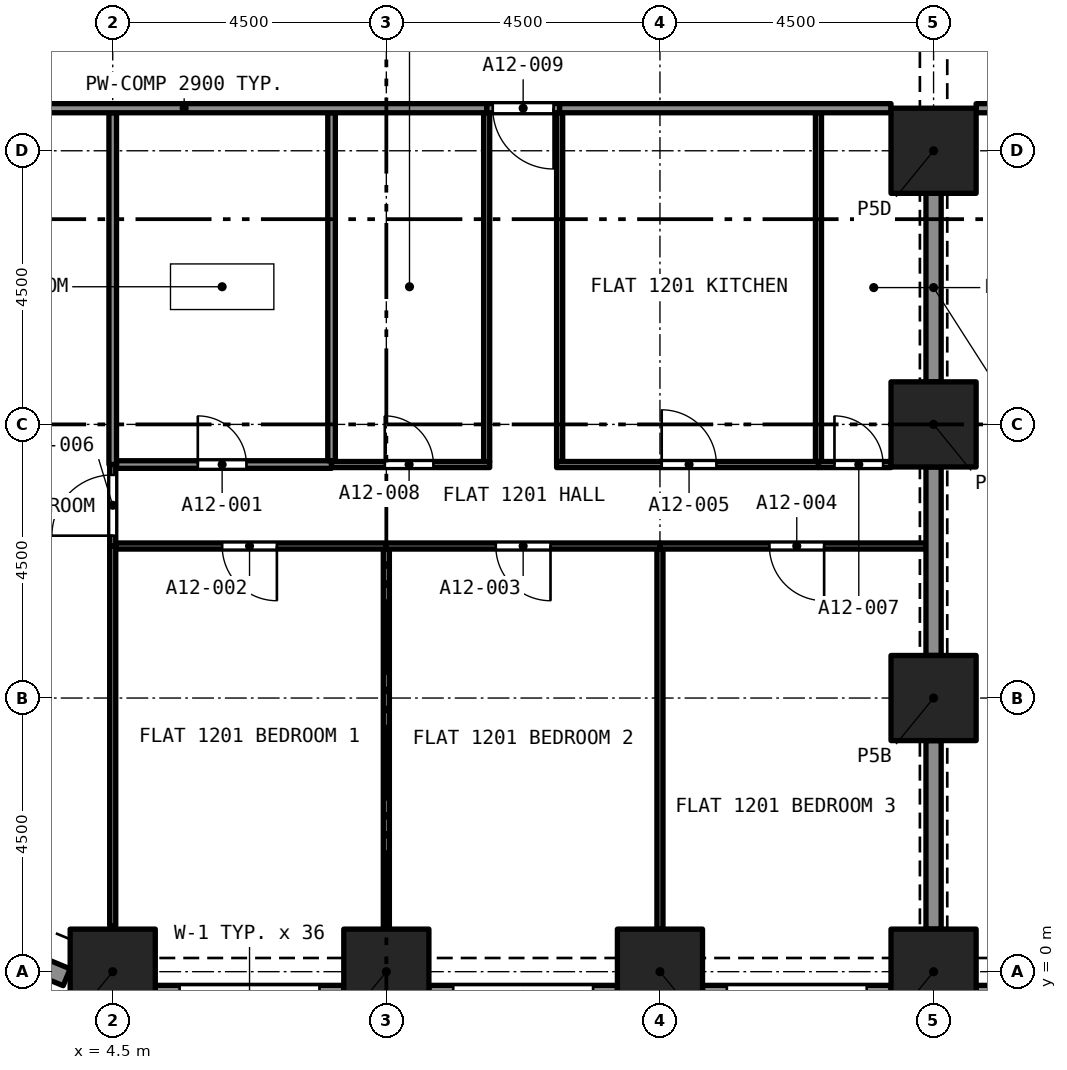
"""IFC4 building model, lengths in metres.
Left out: names, types, materials, properties, quantities, classifications, styles, units other than length and angle.
Written with IfcOpenShell. Run it as: python <this file> out.ifc"""

import sys

from ifc_helpers import new_model, si_unit, direction, frame, frame_2d, origin, origin_2d, place, context, subcontext, project, spatial, rectangle, extrude, element, fill, save


model = new_model("IFC4")
c1 = context("Model", 3, precision=1e-05, world=origin(), true_north=direction((0.0, 1.0)))
c2 = subcontext(c1, "Body", "Model", "MODEL_VIEW")
j1 = project(units=[si_unit("LENGTHUNIT", "METRE"), si_unit("PLANEANGLEUNIT", "RADIAN")], contexts=[c1])
p1 = place(None, origin())
s1 = spatial("IfcSite", under=j1, at=p1, CompositionType="ELEMENT")
p2 = place(p1, origin())
s2 = spatial("IfcBuilding", under=s1, at=p2, CompositionType="ELEMENT")
p3 = place(p2, frame((0.0, 0.0, 49.6)))
s3 = spatial("IfcBuildingStorey", under=s2, at=p3, CompositionType="ELEMENT", Elevation=49.6)
for number, where, z_axis, x_axis in (
    (1, (4.5, 0.0, 0.0), (0.0, 0.0, 1.0), (1.0, 0.0, 0.0)),
    (2, (9.0, 0.0, 0.0), (0.0, 0.0, 1.0), (1.0, 0.0, 0.0)),
    (3, (13.5, 0.0, 0.0), (0.0, 0.0, 1.0), (1.0, 0.0, 0.0)),
    (4, (18.0, 0.0, 0.0), (0.0, 0.0, 1.0), (1.0, 0.0, 0.0)),
    (5, (18.0, 4.5, 0.0), (0.0, 0.0, 1.0), (1.0, 0.0, 0.0)),
    (6, (18.0, 9.0, 0.0), (0.0, 0.0, 1.0), (1.0, 0.0, 0.0)),
    (7, (18.0, 13.5, 0.0), (0.0, 0.0, 1.0), (1.0, 0.0, 0.0)),
):
    element("IfcColumn", number, at=place(p3, frame(where, z_axis=z_axis, x_axis=x_axis)), inside=s3, PredefinedType="COLUMN", context=c2, shape_type="SweptSolid", body=[
        extrude(rectangle(XDim=1.4, YDim=1.4, at=origin_2d()), origin(), (0.0, 0.0, 1.0), 3.2),
    ])
p4 = place(p3, frame((3.743, -0.092, 0.0), z_axis=(0.0, 0.0, 1.0), x_axis=(-0.923857286003, 0.382737135771, 0.0)))
e8 = element("IfcWall", 8, at=p4, inside=s3, PredefinedType="SOLIDWALL", context=c2, shape_type="SweptSolid", body=[
    extrude(rectangle(XDim=1.865, YDim=0.3, at=frame_2d((0.933, 0.0))), origin(), (0.0, 0.0, 1.0), 3.2),
])
p5 = place(p4, frame((0.508, 0.0, 0.45)))
e9 = element("IfcOpeningElement", 9, at=p5, cuts=e8, PredefinedType="OPENING", context=c2, shape_type="SweptSolid", body=[
    extrude(rectangle(XDim=1.1, YDim=1.95, at=frame_2d((0.55, 0.975))), frame((0.0, 0.16, 0.0), z_axis=(0.0, -1.0, 0.0), x_axis=(1.0, 0.0, 0.0)), (0.0, 0.0, 1.0), 0.32),
])
p6 = place(p3, frame((8.3, -0.375, 0.0), z_axis=(0.0, 0.0, 1.0), x_axis=(-1.0, 0.0, 0.0)))
e10 = element("IfcWall", 10, at=p6, inside=s3, PredefinedType="SOLIDWALL", context=c2, shape_type="SweptSolid", body=[
    extrude(rectangle(XDim=3.1, YDim=0.3, at=frame_2d((1.55, 0.0))), origin(), (0.0, 0.0, 1.0), 3.2),
])
p7 = place(p6, frame((0.4, 0.0, 0.45)))
e11 = element("IfcOpeningElement", 11, at=p7, cuts=e10, PredefinedType="OPENING", context=c2, shape_type="SweptSolid", body=[
    extrude(rectangle(XDim=2.3, YDim=1.95, at=frame_2d((1.15, 0.975))), frame((0.0, 0.16, 0.0), z_axis=(0.0, -1.0, 0.0), x_axis=(1.0, 0.0, 0.0)), (0.0, 0.0, 1.0), 0.32),
])
p8 = place(p3, frame((12.8, -0.375, 0.0), z_axis=(0.0, 0.0, 1.0), x_axis=(-1.0, 0.0, 0.0)))
e12 = element("IfcWall", 12, at=p8, inside=s3, PredefinedType="SOLIDWALL", context=c2, shape_type="SweptSolid", body=[
    extrude(rectangle(XDim=3.1, YDim=0.3, at=frame_2d((1.55, 0.0))), origin(), (0.0, 0.0, 1.0), 3.2),
])
p9 = place(p8, frame((0.4, 0.0, 0.45)))
e13 = element("IfcOpeningElement", 13, at=p9, cuts=e12, PredefinedType="OPENING", context=c2, shape_type="SweptSolid", body=[
    extrude(rectangle(XDim=2.3, YDim=1.95, at=frame_2d((1.15, 0.975))), frame((0.0, 0.16, 0.0), z_axis=(0.0, -1.0, 0.0), x_axis=(1.0, 0.0, 0.0)), (0.0, 0.0, 1.0), 0.32),
])
p10 = place(p3, frame((17.3, -0.375, 0.0), z_axis=(0.0, 0.0, 1.0), x_axis=(-1.0, 0.0, 0.0)))
e14 = element("IfcWall", 14, at=p10, inside=s3, PredefinedType="SOLIDWALL", context=c2, shape_type="SweptSolid", body=[
    extrude(rectangle(XDim=3.1, YDim=0.3, at=frame_2d((1.55, 0.0))), origin(), (0.0, 0.0, 1.0), 3.2),
])
p11 = place(p10, frame((0.4, 0.0, 0.45)))
e15 = element("IfcOpeningElement", 15, at=p11, cuts=e14, PredefinedType="OPENING", context=c2, shape_type="SweptSolid", body=[
    extrude(rectangle(XDim=2.3, YDim=1.95, at=frame_2d((1.15, 0.975))), frame((0.0, 0.16, 0.0), z_axis=(0.0, -1.0, 0.0), x_axis=(1.0, 0.0, 0.0)), (0.0, 0.0, 1.0), 0.32),
])
p12 = place(p3, frame((21.8, -0.375, 0.0), z_axis=(0.0, 0.0, 1.0), x_axis=(-1.0, 0.0, 0.0)))
e16 = element("IfcWall", 16, at=p12, inside=s3, PredefinedType="SOLIDWALL", context=c2, shape_type="SweptSolid", body=[
    extrude(rectangle(XDim=3.1, YDim=0.3, at=frame_2d((1.55, 0.0))), origin(), (0.0, 0.0, 1.0), 3.2),
])
p13 = place(p12, frame((0.4, 0.0, 0.45)))
e17 = element("IfcOpeningElement", 17, at=p13, cuts=e16, PredefinedType="OPENING", context=c2, shape_type="SweptSolid", body=[
    extrude(rectangle(XDim=2.3, YDim=1.95, at=frame_2d((1.15, 0.975))), frame((0.0, 0.16, 0.0), z_axis=(0.0, -1.0, 0.0), x_axis=(1.0, 0.0, 0.0)), (0.0, 0.0, 1.0), 0.32),
])
p14 = place(p3, frame((4.562, 8.34, 0.0), z_axis=(0.0, 0.0, 1.0), x_axis=(1.0, 0.0, 0.0)))
e18 = element("IfcWall", 18, at=p14, inside=s3, PredefinedType="PARTITIONING", context=c2, shape_type="SweptSolid", body=[
    extrude(rectangle(XDim=3.536, YDim=0.125, at=frame_2d((1.768, 0.0))), origin(), (0.0, 0.0, 1.0), 2.9),
])
p15 = place(p14, frame((1.337, 0.0, 0.0)))
e19 = element("IfcOpeningElement", 19, at=p15, cuts=e18, PredefinedType="OPENING", context=c2, shape_type="SweptSolid", body=[
    extrude(rectangle(XDim=0.8, YDim=2.1, at=frame_2d((0.4, 1.05))), frame((0.0, 0.073, 0.0), z_axis=(0.0, -1.0, 0.0), x_axis=(1.0, 0.0, 0.0)), (0.0, 0.0, 1.0), 0.145),
])
p16 = place(p3, frame((4.5, 8.34, 0.0), z_axis=(0.0, 0.0, 1.0), x_axis=(0.0, 1.0, 0.0)))
e20 = element("IfcWall", 20, at=p16, inside=s3, PredefinedType="PARTITIONING", context=c2, shape_type="SweptSolid", body=[
    extrude(rectangle(XDim=5.785, YDim=0.125, at=frame_2d((2.893, 0.0))), origin(), (0.0, 0.0, 1.0), 2.9),
])
p17 = place(p3, frame((8.099, 8.403, 0.0), z_axis=(0.0, 0.0, 1.0), x_axis=(0.0, 1.0, 0.0)))
e21 = element("IfcWall", 21, at=p17, inside=s3, PredefinedType="PARTITIONING", context=c2, shape_type="SweptSolid", body=[
    extrude(rectangle(XDim=5.722, YDim=0.125, at=frame_2d((2.861, 0.0))), origin(), (0.0, 0.0, 1.0), 2.9),
])
p18 = place(p3, frame((9.0, 0.7, 0.0), z_axis=(0.0, 0.0, 1.0), x_axis=(0.0, 1.0, 0.0)))
e22 = element("IfcWall", 22, at=p18, inside=s3, PredefinedType="PARTITIONING", context=c2, shape_type="SweptSolid", body=[
    extrude(rectangle(XDim=6.25, YDim=0.1, at=frame_2d((3.125, 0.0))), origin(), (0.0, 0.0, 1.0), 2.9),
])
p19 = place(p3, frame((9.0, 7.0, 0.0), z_axis=(0.0, 0.0, 1.0), x_axis=(-1.0, 0.0, 0.0)))
e23 = element("IfcWall", 23, at=p19, inside=s3, PredefinedType="PARTITIONING", context=c2, shape_type="SweptSolid", body=[
    extrude(rectangle(XDim=4.45, YDim=0.1, at=frame_2d((2.225, 0.0))), origin(), (0.0, 0.0, 1.0), 2.9),
])
p20 = place(p19, frame((1.8, 0.0, 0.0)))
e24 = element("IfcOpeningElement", 24, at=p20, cuts=e23, PredefinedType="OPENING", context=c2, shape_type="SweptSolid", body=[
    extrude(rectangle(XDim=0.9, YDim=2.1, at=frame_2d((0.45, 1.05))), frame((0.0, 0.06, 0.0), z_axis=(0.0, -1.0, 0.0), x_axis=(1.0, 0.0, 0.0)), (0.0, 0.0, 1.0), 0.12),
])
p21 = place(p3, frame((4.5, 0.758, 0.0), z_axis=(0.0, 0.0, 1.0), x_axis=(0.0, 1.0, 0.0)))
e25 = element("IfcWall", 25, at=p21, inside=s3, PredefinedType="PARTITIONING", context=c2, shape_type="SweptSolid", body=[
    extrude(rectangle(XDim=6.242, YDim=0.1, at=frame_2d((3.121, 0.0))), origin(), (0.0, 0.0, 1.0), 2.9),
])
p22 = place(p3, frame((13.5, 0.7, 0.0), z_axis=(0.0, 0.0, 1.0), x_axis=(0.0, 1.0, 0.0)))
e26 = element("IfcWall", 26, at=p22, inside=s3, PredefinedType="PARTITIONING", context=c2, shape_type="SweptSolid", body=[
    extrude(rectangle(XDim=6.25, YDim=0.1, at=frame_2d((3.125, 0.0))), origin(), (0.0, 0.0, 1.0), 2.9),
])
p23 = place(p3, frame((13.5, 7.0, 0.0), z_axis=(0.0, 0.0, 1.0), x_axis=(-1.0, 0.0, 0.0)))
e27 = element("IfcWall", 27, at=p23, inside=s3, PredefinedType="PARTITIONING", context=c2, shape_type="SweptSolid", body=[
    extrude(rectangle(XDim=4.5, YDim=0.1, at=frame_2d((2.25, 0.0))), origin(), (0.0, 0.0, 1.0), 2.9),
])
p24 = place(p23, frame((1.8, 0.0, 0.0)))
e28 = element("IfcOpeningElement", 28, at=p24, cuts=e27, PredefinedType="OPENING", context=c2, shape_type="SweptSolid", body=[
    extrude(rectangle(XDim=0.9, YDim=2.1, at=frame_2d((0.45, 1.05))), frame((0.0, 0.06, 0.0), z_axis=(0.0, -1.0, 0.0), x_axis=(1.0, 0.0, 0.0)), (0.0, 0.0, 1.0), 0.12),
])
p25 = place(p3, frame((17.875, 7.0, 0.0), z_axis=(0.0, 0.0, 1.0), x_axis=(-1.0, 0.0, 0.0)))
e29 = element("IfcWall", 29, at=p25, inside=s3, PredefinedType="PARTITIONING", context=c2, shape_type="SweptSolid", body=[
    extrude(rectangle(XDim=4.375, YDim=0.1, at=frame_2d((2.188, 0.0))), origin(), (0.0, 0.0, 1.0), 2.9),
])
p26 = place(p25, frame((1.675, 0.0, 0.0)))
e30 = element("IfcOpeningElement", 30, at=p26, cuts=e29, PredefinedType="OPENING", context=c2, shape_type="SweptSolid", body=[
    extrude(rectangle(XDim=0.9, YDim=2.1, at=frame_2d((0.45, 1.05))), frame((0.0, 0.06, 0.0), z_axis=(0.0, -1.0, 0.0), x_axis=(1.0, 0.0, 0.0)), (0.0, 0.0, 1.0), 0.12),
])
for number, where, z_axis, x_axis in (
    (31, (18.0, 5.2, 0.0), (0.0, 0.0, 1.0), (0.0, 1.0, 0.0)),
    (32, (18.0, 0.7, 0.0), (0.0, 0.0, 1.0), (0.0, 1.0, 0.0)),
):
    element("IfcWall", number, at=place(p3, frame(where, z_axis=z_axis, x_axis=x_axis)), inside=s3, PredefinedType="PARTITIONING", context=c2, shape_type="SweptSolid", body=[
        extrude(rectangle(XDim=3.1, YDim=0.25, at=frame_2d((1.55, 0.0))), origin(), (0.0, 0.0, 1.0), 2.38),
    ])
p27 = place(p3, frame((11.85, 8.39, 0.0), z_axis=(0.0, 0.0, 1.0), x_axis=(0.0, 1.0, 0.0)))
e33 = element("IfcWall", 33, at=p27, inside=s3, PredefinedType="PARTITIONING", context=c2, shape_type="SweptSolid", body=[
    extrude(rectangle(XDim=5.735, YDim=0.1, at=frame_2d((2.868, 0.0))), origin(), (0.0, 0.0, 1.0), 2.9),
])
p28 = place(p3, frame((11.8, 8.34, 0.0), z_axis=(0.0, 0.0, 1.0), x_axis=(1.0, 0.0, 0.0)))
e34 = element("IfcWall", 34, at=p28, inside=s3, PredefinedType="PARTITIONING", context=c2, shape_type="SweptSolid", body=[
    extrude(rectangle(XDim=4.307, YDim=0.1, at=frame_2d((2.154, 0.0))), origin(), (0.0, 0.0, 1.0), 2.9),
])
p29 = place(p28, frame((1.729, 0.0, 0.0)))
e35 = element("IfcOpeningElement", 35, at=p29, cuts=e34, PredefinedType="OPENING", context=c2, shape_type="SweptSolid", body=[
    extrude(rectangle(XDim=0.9, YDim=2.1, at=frame_2d((0.45, 1.05))), frame((0.0, 0.06, 0.0), z_axis=(0.0, -1.0, 0.0), x_axis=(1.0, 0.0, 0.0)), (0.0, 0.0, 1.0), 0.12),
])
p30 = place(p3, frame((4.5, 7.0, 0.0), z_axis=(0.0, 0.0, 1.0), x_axis=(0.0, 1.0, 0.0)))
e36 = element("IfcWall", 36, at=p30, inside=s3, PredefinedType="PARTITIONING", context=c2, shape_type="SweptSolid", body=[
    extrude(rectangle(XDim=1.34, YDim=0.1, at=frame_2d((0.67, 0.0))), origin(), (0.0, 0.0, 1.0), 2.9),
])
p31 = place(p30, frame((0.17, 0.0, 0.0)))
e37 = element("IfcOpeningElement", 37, at=p31, cuts=e36, PredefinedType="OPENING", context=c2, shape_type="SweptSolid", body=[
    extrude(rectangle(XDim=1.0, YDim=2.1, at=frame_2d((0.5, 1.05))), frame((0.0, 0.06, 0.0), z_axis=(0.0, -1.0, 0.0), x_axis=(1.0, 0.0, 0.0)), (0.0, 0.0, 1.0), 0.12),
])
p32 = place(p3, frame((16.107, 8.34, 0.0), z_axis=(0.0, 0.0, 1.0), x_axis=(1.0, 0.0, 0.0)))
e38 = element("IfcWall", 38, at=p32, inside=s3, PredefinedType="PARTITIONING", context=c2, shape_type="SweptSolid", body=[
    extrude(rectangle(XDim=1.193, YDim=0.1, at=frame_2d((0.596, 0.0))), origin(), (0.0, 0.0, 1.0), 2.9),
])
p33 = place(p32, frame((0.263, 0.0, 0.0)))
e39 = element("IfcOpeningElement", 39, at=p33, cuts=e38, PredefinedType="OPENING", context=c2, shape_type="SweptSolid", body=[
    extrude(rectangle(XDim=0.8, YDim=2.1, at=frame_2d((0.4, 1.05))), frame((0.0, 0.06, 0.0), z_axis=(0.0, -1.0, 0.0), x_axis=(1.0, 0.0, 0.0)), (0.0, 0.0, 1.0), 0.12),
])
p34 = place(p3, frame((8.099, 8.34, 0.0), z_axis=(0.0, 0.0, 1.0), x_axis=(1.0, 0.0, 0.0)))
e40 = element("IfcWall", 40, at=p34, inside=s3, PredefinedType="PARTITIONING", context=c2, shape_type="SweptSolid", body=[
    extrude(rectangle(XDim=2.601, YDim=0.1, at=frame_2d((1.301, 0.0))), origin(), (0.0, 0.0, 1.0), 2.9),
])
p35 = place(p34, frame((0.876, 0.0, 0.0)))
e41 = element("IfcOpeningElement", 41, at=p35, cuts=e40, PredefinedType="OPENING", context=c2, shape_type="SweptSolid", body=[
    extrude(rectangle(XDim=0.8, YDim=2.1, at=frame_2d((0.4, 1.05))), frame((0.0, 0.06, 0.0), z_axis=(0.0, -1.0, 0.0), x_axis=(1.0, 0.0, 0.0)), (0.0, 0.0, 1.0), 0.12),
])
p36 = place(p3, frame((10.65, 8.39, 0.0), z_axis=(0.0, 0.0, 1.0), x_axis=(0.0, 1.0, 0.0)))
e42 = element("IfcWall", 42, at=p36, inside=s3, PredefinedType="PARTITIONING", context=c2, shape_type="SweptSolid", body=[
    extrude(rectangle(XDim=5.735, YDim=0.1, at=frame_2d((2.868, 0.0))), origin(), (0.0, 0.0, 1.0), 2.9),
])
p37 = place(p3, frame((11.85, 14.2, 0.0), z_axis=(0.0, 0.0, 1.0), x_axis=(-1.0, 0.0, 0.0)))
e43 = element("IfcWall", 43, at=p37, inside=s3, PredefinedType="PARTITIONING", context=c2, shape_type="SweptSolid", body=[
    extrude(rectangle(XDim=1.2, YDim=0.15, at=frame_2d((0.6, 0.0))), origin(), (0.0, 0.0, 1.0), 2.9),
])
p38 = place(p37, frame((0.1, 0.0, 0.0)))
e44 = element("IfcOpeningElement", 44, at=p38, cuts=e43, PredefinedType="OPENING", context=c2, shape_type="SweptSolid", body=[
    extrude(rectangle(XDim=1.0, YDim=2.1, at=frame_2d((0.5, 1.05))), frame((0.0, 0.085, 0.0), z_axis=(0.0, -1.0, 0.0), x_axis=(1.0, 0.0, 0.0)), (0.0, 0.0, 1.0), 0.17),
])
p39 = place(p3, frame((16.107, 8.39, 0.0), z_axis=(0.0, 0.0, 1.0), x_axis=(0.0, 1.0, 0.0)))
e45 = element("IfcWall", 45, at=p39, inside=s3, PredefinedType="PARTITIONING", context=c2, shape_type="SweptSolid", body=[
    extrude(rectangle(XDim=5.735, YDim=0.1, at=frame_2d((2.868, 0.0))), origin(), (0.0, 0.0, 1.0), 2.9),
])
p40 = place(p3, frame((11.85, 14.2, 0.0), z_axis=(0.0, 0.0, 1.0), x_axis=(1.0, 0.0, 0.0)))
e46 = element("IfcWall", 46, at=p40, inside=s3, PredefinedType="PARTITIONING", context=c2, shape_type="SweptSolid", body=[
    extrude(rectangle(XDim=5.45, YDim=0.15, at=frame_2d((2.725, 0.0))), origin(), (0.0, 0.0, 1.0), 2.9),
])
p41 = place(p3, frame((0.7, 14.2, 0.0), z_axis=(0.0, 0.0, 1.0), x_axis=(1.0, 0.0, 0.0)))
e47 = element("IfcWall", 47, at=p41, inside=s3, PredefinedType="PARTITIONING", context=c2, shape_type="SweptSolid", body=[
    extrude(rectangle(XDim=9.95, YDim=0.15, at=frame_2d((4.975, 0.0))), origin(), (0.0, 0.0, 1.0), 2.9),
])
p42 = place(p3, frame((18.0, 9.7, 0.0), z_axis=(0.0, 0.0, 1.0), x_axis=(0.0, 1.0, 0.0)))
e48 = element("IfcWall", 48, at=p42, inside=s3, PredefinedType="PARTITIONING", context=c2, shape_type="SweptSolid", body=[
    extrude(rectangle(XDim=3.1, YDim=0.25, at=frame_2d((1.55, 0.0))), origin(), (0.0, 0.0, 1.0), 2.38),
])
p43 = place(p3, frame((27.0, 14.2, 0.0), z_axis=(0.0, 0.0, 1.0), x_axis=(-1.0, 0.0, 0.0)))
e49 = element("IfcWall", 49, at=p43, inside=s3, PredefinedType="PARTITIONING", context=c2, shape_type="SweptSolid", body=[
    extrude(rectangle(XDim=8.3, YDim=0.15, at=frame_2d((4.15, 0.0))), origin(), (0.0, 0.0, 1.0), 2.75),
])
p44 = place(p43, frame((4.0, 0.0, 0.0)))
e50 = element("IfcOpeningElement", 50, at=p44, cuts=e49, PredefinedType="OPENING", context=c2, shape_type="SweptSolid", body=[
    extrude(rectangle(XDim=1.0, YDim=2.1, at=frame_2d((0.5, 1.05))), frame((0.0, 0.085, 0.0), z_axis=(0.0, -1.0, 0.0), x_axis=(1.0, 0.0, 0.0)), (0.0, 0.0, 1.0), 0.17),
])
p45 = place(p15, origin())
e51 = element("IfcDoor", 51, at=p45, inside=s3, OperationType="SINGLE_SWING_LEFT", PredefinedType="DOOR", context=c2, shape_type="SweptSolid", body=[
    extrude(rectangle(XDim=0.8, YDim=2.1, at=frame_2d((0.4, 1.05))), frame((0.0, 0.025, 0.0), z_axis=(0.0, -1.0, 0.0), x_axis=(1.0, 0.0, 0.0)), (0.0, 0.0, 1.0), 0.05),
])
fill(e19, e51)
p46 = place(p20, origin())
e52 = element("IfcDoor", 52, at=p46, inside=s3, OperationType="SINGLE_SWING_RIGHT", PredefinedType="DOOR", context=c2, shape_type="SweptSolid", body=[
    extrude(rectangle(XDim=0.9, YDim=2.1, at=frame_2d((0.45, 1.05))), frame((0.0, 0.025, 0.0), z_axis=(0.0, -1.0, 0.0), x_axis=(1.0, 0.0, 0.0)), (0.0, 0.0, 1.0), 0.05),
])
fill(e24, e52)
p47 = place(p24, origin())
e53 = element("IfcDoor", 53, at=p47, inside=s3, OperationType="SINGLE_SWING_LEFT", PredefinedType="DOOR", context=c2, shape_type="SweptSolid", body=[
    extrude(rectangle(XDim=0.9, YDim=2.1, at=frame_2d((0.45, 1.05))), frame((0.0, 0.025, 0.0), z_axis=(0.0, -1.0, 0.0), x_axis=(1.0, 0.0, 0.0)), (0.0, 0.0, 1.0), 0.05),
])
fill(e28, e53)
p48 = place(p26, origin())
e54 = element("IfcDoor", 54, at=p48, inside=s3, OperationType="SINGLE_SWING_LEFT", PredefinedType="DOOR", context=c2, shape_type="SweptSolid", body=[
    extrude(rectangle(XDim=0.9, YDim=2.1, at=frame_2d((0.45, 1.05))), frame((0.0, 0.025, 0.0), z_axis=(0.0, -1.0, 0.0), x_axis=(1.0, 0.0, 0.0)), (0.0, 0.0, 1.0), 0.05),
])
fill(e30, e54)
p49 = place(p29, origin())
e55 = element("IfcDoor", 55, at=p49, inside=s3, OperationType="SINGLE_SWING_RIGHT", PredefinedType="DOOR", context=c2, shape_type="SweptSolid", body=[
    extrude(rectangle(XDim=0.9, YDim=2.1, at=frame_2d((0.45, 1.05))), frame((0.0, 0.025, 0.0), z_axis=(0.0, -1.0, 0.0), x_axis=(1.0, 0.0, 0.0)), (0.0, 0.0, 1.0), 0.05),
])
fill(e35, e55)
p50 = place(p31, origin())
e56 = element("IfcDoor", 56, at=p50, inside=s3, OperationType="SINGLE_SWING_RIGHT", PredefinedType="DOOR", context=c2, shape_type="SweptSolid", body=[
    extrude(rectangle(XDim=1.0, YDim=2.1, at=frame_2d((0.5, 1.05))), frame((0.0, 0.025, 0.0), z_axis=(0.0, -1.0, 0.0), x_axis=(1.0, 0.0, 0.0)), (0.0, 0.0, 1.0), 0.05),
])
fill(e37, e56)
p51 = place(p33, origin())
e57 = element("IfcDoor", 57, at=p51, inside=s3, OperationType="SINGLE_SWING_RIGHT", PredefinedType="DOOR", context=c2, shape_type="SweptSolid", body=[
    extrude(rectangle(XDim=0.8, YDim=2.1, at=frame_2d((0.4, 1.05))), frame((0.0, 0.025, 0.0), z_axis=(0.0, -1.0, 0.0), x_axis=(1.0, 0.0, 0.0)), (0.0, 0.0, 1.0), 0.05),
])
fill(e39, e57)
p52 = place(p35, origin())
e58 = element("IfcDoor", 58, at=p52, inside=s3, OperationType="SINGLE_SWING_LEFT", PredefinedType="DOOR", context=c2, shape_type="SweptSolid", body=[
    extrude(rectangle(XDim=0.8, YDim=2.1, at=frame_2d((0.4, 1.05))), frame((0.0, 0.025, 0.0), z_axis=(0.0, -1.0, 0.0), x_axis=(1.0, 0.0, 0.0)), (0.0, 0.0, 1.0), 0.05),
])
fill(e41, e58)
p53 = place(p38, origin())
e59 = element("IfcDoor", 59, at=p53, inside=s3, OperationType="SINGLE_SWING_RIGHT", PredefinedType="DOOR", context=c2, shape_type="SweptSolid", body=[
    extrude(rectangle(XDim=1.0, YDim=2.1, at=frame_2d((0.5, 1.05))), frame((0.0, 0.025, 0.0), z_axis=(0.0, -1.0, 0.0), x_axis=(1.0, 0.0, 0.0)), (0.0, 0.0, 1.0), 0.05),
])
fill(e44, e59)
save(model, sys.argv[1])
